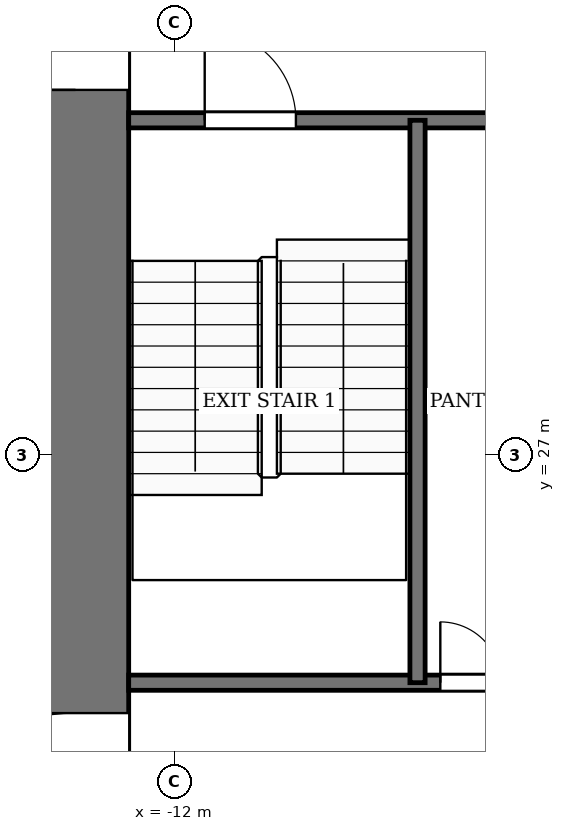
"""IFC4 building model, lengths in metres.
Left out: names, types, materials, properties, quantities, classifications, styles, units other than length and angle.
Written with IfcOpenShell. Run it as: python <this file> out.ifc"""

import sys

from ifc_helpers import new_model, si_unit, direction, frame, frame_2d, origin, place, context, subcontext, project, spatial, rectangle, extrude, element, fill, save


model = new_model("IFC4")
c1 = context("Model", 3, precision=1e-05, world=origin(), true_north=direction((0.0, 1.0)))
c2 = subcontext(c1, "Body", "Model", "MODEL_VIEW")
j1 = project(units=[si_unit("LENGTHUNIT", "METRE"), si_unit("PLANEANGLEUNIT", "RADIAN")], contexts=[c1])
p1 = place(None, origin())
s1 = spatial("IfcSite", under=j1, at=p1, CompositionType="ELEMENT")
p2 = place(p1, origin())
s2 = spatial("IfcBuilding", under=s1, at=p2, CompositionType="ELEMENT")
p3 = place(p2, frame((0.0, 0.0, 22.0)))
s3 = spatial("IfcBuildingStorey", under=s2, at=p3, CompositionType="ELEMENT", Elevation=22.0)
p4 = place(p3, frame((-13.3, 18.4, -0.13), z_axis=(0.0, 0.0, 1.0), x_axis=(0.0, 1.0, 0.0)))
e1 = element("IfcWall", 1, at=p4, inside=s3, PredefinedType="SHEAR", context=c2, shape_type="SweptSolid", body=[
    extrude(rectangle(XDim=19.2, YDim=1.4, at=frame_2d((9.6, 0.0))), origin(), (0.0, 0.0, 1.0), 4.0),
])
p5 = place(p4, frame((2.8, 0.0, 0.13)))
e2 = element("IfcOpeningElement", 2, at=p5, cuts=e1, PredefinedType="OPENING", context=c2, shape_type="SweptSolid", body=[
    extrude(rectangle(XDim=2.4, YDim=2.4, at=frame_2d((1.2, 1.2))), frame((0.0, 0.71, 0.0), z_axis=(0.0, -1.0, 0.0), x_axis=(1.0, 0.0, 0.0)), (0.0, 0.0, 1.0), 1.42),
])
p6 = place(p4, frame((13.4, 0.0, 0.13)))
e3 = element("IfcOpeningElement", 3, at=p6, cuts=e1, PredefinedType="OPENING", context=c2, shape_type="SweptSolid", body=[
    extrude(rectangle(XDim=1.4, YDim=2.2, at=frame_2d((0.7, 1.1))), frame((0.0, 0.71, 0.0), z_axis=(0.0, -1.0, 0.0), x_axis=(1.0, 0.0, 0.0)), (0.0, 0.0, 1.0), 1.42),
])
p7 = place(p3, frame((-12.6, 24.0, 0.0), z_axis=(0.0, 0.0, 1.0), x_axis=(1.0, 0.0, 0.0)))
e4 = element("IfcWall", 4, at=p7, inside=s3, PredefinedType="PARTITIONING", context=c2, shape_type="SweptSolid", body=[
    extrude(rectangle(XDim=6.6, YDim=0.2, at=frame_2d((3.3, 0.0))), origin(), (0.0, 0.0, 1.0), 3.87),
])
p8 = place(p7, frame((4.1, 0.0, 0.0)))
e5 = element("IfcOpeningElement", 5, at=p8, cuts=e4, PredefinedType="OPENING", context=c2, shape_type="SweptSolid", body=[
    extrude(rectangle(XDim=0.8, YDim=2.1, at=frame_2d((0.4, 1.05))), frame((0.0, 0.11, 0.0), z_axis=(0.0, -1.0, 0.0), x_axis=(1.0, 0.0, 0.0)), (0.0, 0.0, 1.0), 0.22),
])
p9 = place(p7, frame((5.5, 0.0, 0.0)))
e6 = element("IfcOpeningElement", 6, at=p9, cuts=e4, PredefinedType="OPENING", context=c2, shape_type="SweptSolid", body=[
    extrude(rectangle(XDim=0.8, YDim=2.1, at=frame_2d((0.4, 1.05))), frame((0.0, 0.11, 0.0), z_axis=(0.0, -1.0, 0.0), x_axis=(1.0, 0.0, 0.0)), (0.0, 0.0, 1.0), 0.22),
])
p10 = place(p3, frame((-12.6, 31.4, 0.0), z_axis=(0.0, 0.0, 1.0), x_axis=(1.0, 0.0, 0.0)))
e7 = element("IfcWall", 7, at=p10, inside=s3, PredefinedType="PARTITIONING", context=c2, shape_type="SweptSolid", body=[
    extrude(rectangle(XDim=6.6, YDim=0.2, at=frame_2d((3.3, 0.0))), origin(), (0.0, 0.0, 1.0), 3.87),
])
p11 = place(p10, frame((1.0, 0.0, 0.0)))
e8 = element("IfcOpeningElement", 8, at=p11, cuts=e7, PredefinedType="OPENING", context=c2, shape_type="SweptSolid", body=[
    extrude(rectangle(XDim=1.2, YDim=2.2, at=frame_2d((0.6, 1.1))), frame((0.0, 0.11, 0.0), z_axis=(0.0, -1.0, 0.0), x_axis=(1.0, 0.0, 0.0)), (0.0, 0.0, 1.0), 0.22),
])
p12 = place(p3, frame((-8.8, 24.0, 0.0), z_axis=(0.0, 0.0, 1.0), x_axis=(0.0, 1.0, 0.0)))
e9 = element("IfcWall", 9, at=p12, inside=s3, PredefinedType="PARTITIONING", context=c2, shape_type="SweptSolid", body=[
    extrude(rectangle(XDim=7.4, YDim=0.2, at=frame_2d((3.7, 0.0))), origin(), (0.0, 0.0, 1.0), 3.87),
])
p13 = place(p8, origin())
e10 = element("IfcDoor", 10, at=p13, inside=s3, OperationType="SINGLE_SWING_LEFT", PredefinedType="DOOR", context=c2, shape_type="SweptSolid", body=[
    extrude(rectangle(XDim=0.8, YDim=2.1, at=frame_2d((0.4, 1.05))), frame((0.0, 0.025, 0.0), z_axis=(0.0, -1.0, 0.0), x_axis=(1.0, 0.0, 0.0)), (0.0, 0.0, 1.0), 0.05),
])
fill(e5, e10)
p14 = place(p11, origin())
e11 = element("IfcDoor", 11, at=p14, inside=s3, OperationType="SINGLE_SWING_RIGHT", PredefinedType="DOOR", context=c2, shape_type="SweptSolid", body=[
    extrude(rectangle(XDim=1.2, YDim=2.2, at=frame_2d((0.6, 1.1))), frame((0.0, 0.025, 0.0), z_axis=(0.0, -1.0, 0.0), x_axis=(1.0, 0.0, 0.0)), (0.0, 0.0, 1.0), 0.05),
])
fill(e8, e11)
p15 = place(p5, origin())
e12 = element("IfcDoor", 12, at=p15, inside=s3, OperationType="DOUBLE_DOOR_SINGLE_SWING", PredefinedType="DOOR", context=c2, shape_type="SweptSolid", body=[
    extrude(rectangle(XDim=2.4, YDim=2.4, at=frame_2d((1.2, 1.2))), frame((0.0, 0.025, 0.0), z_axis=(0.0, -1.0, 0.0), x_axis=(1.0, 0.0, 0.0)), (0.0, 0.0, 1.0), 0.05),
])
fill(e2, e12)
p16 = place(p6, origin())
e13 = element("IfcDoor", 13, at=p16, inside=s3, OperationType="SINGLE_SWING_RIGHT", PredefinedType="DOOR", context=c2, shape_type="SweptSolid", body=[
    extrude(rectangle(XDim=1.4, YDim=2.2, at=frame_2d((0.7, 1.1))), frame((0.0, 0.025, 0.0), z_axis=(0.0, -1.0, 0.0), x_axis=(1.0, 0.0, 0.0)), (0.0, 0.0, 1.0), 0.05),
])
fill(e3, e13)
save(model, sys.argv[1])
